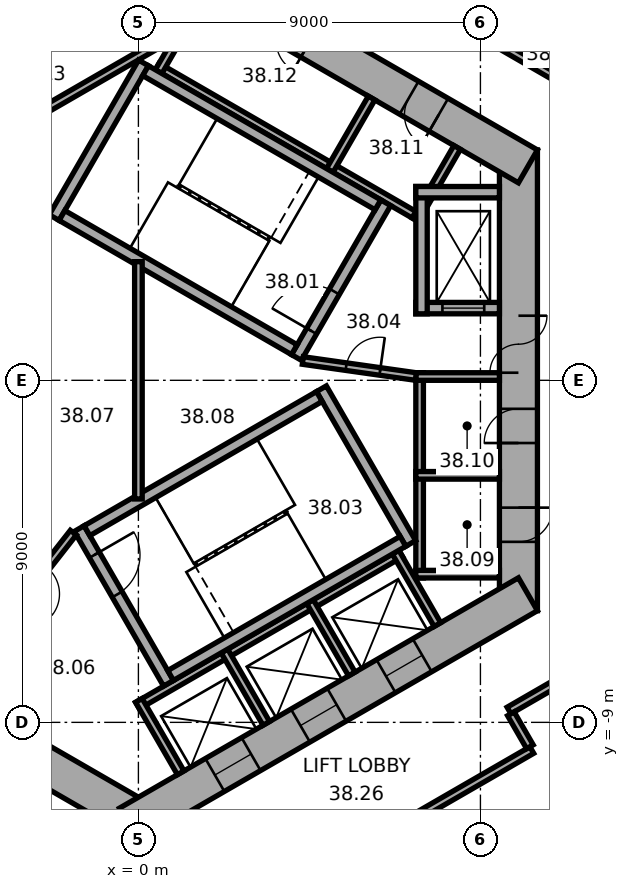
"""IFC4 building model, lengths in metres.
Left out: names, types, materials, properties, quantities, classifications, styles, units other than length and angle.
Written with IfcOpenShell. Run it as: python <this file> out.ifc"""

import sys

from ifc_helpers import new_model, si_unit, direction, frame, frame_2d, origin, place, context, subcontext, project, spatial, rectangle, extrude, element, fill, save


model = new_model("IFC4")
c1 = context("Model", 3, precision=1e-05, world=origin(), true_north=direction((0.0, 1.0)))
c2 = subcontext(c1, "Body", "Model", "MODEL_VIEW")
j1 = project(units=[si_unit("LENGTHUNIT", "METRE"), si_unit("PLANEANGLEUNIT", "RADIAN")], contexts=[c1])
p1 = place(None, origin())
s1 = spatial("IfcSite", under=j1, at=p1, CompositionType="ELEMENT")
p2 = place(p1, origin())
s2 = spatial("IfcBuilding", under=s1, at=p2, CompositionType="ELEMENT")
p3 = place(p2, frame((0.0, 0.0, 157.7)))
s3 = spatial("IfcBuildingStorey", under=s2, at=p3, CompositionType="ELEMENT", Elevation=157.7)
p4 = place(p3, frame((10.0, -6.062, 0.0), z_axis=(0.0, 0.0, 1.0), x_axis=(0.0, 1.0, 0.0)))
e1 = element("IfcWall", 1, at=p4, inside=s3, PredefinedType="SHEAR", context=c2, shape_type="SweptSolid", body=[
    extrude(rectangle(XDim=12.125, YDim=1.0, at=frame_2d((6.062, 0.0))), origin(), (0.0, 0.0, 1.0), 3.7),
])
p5 = place(p4, frame((6.262, 0.0, 0.0)))
e2 = element("IfcOpeningElement", 2, at=p5, cuts=e1, PredefinedType="OPENING", context=c2, shape_type="SweptSolid", body=[
    extrude(rectangle(XDim=1.5, YDim=2.1, at=frame_2d((0.75, 1.05))), frame((0.0, 0.51, 0.0), z_axis=(0.0, -1.0, 0.0), x_axis=(1.0, 0.0, 0.0)), (0.0, 0.0, 1.0), 1.02),
])
p6 = place(p4, frame((1.812, 0.0, 0.0)))
e3 = element("IfcOpeningElement", 3, at=p6, cuts=e1, PredefinedType="OPENING", context=c2, shape_type="SweptSolid", body=[
    extrude(rectangle(XDim=0.9, YDim=2.1, at=frame_2d((0.45, 1.05))), frame((0.0, 0.51, 0.0), z_axis=(0.0, -1.0, 0.0), x_axis=(1.0, 0.0, 0.0)), (0.0, 0.0, 1.0), 1.02),
])
p7 = place(p4, frame((4.412, 0.0, 0.0)))
e4 = element("IfcOpeningElement", 4, at=p7, cuts=e1, PredefinedType="OPENING", context=c2, shape_type="SweptSolid", body=[
    extrude(rectangle(XDim=0.9, YDim=2.1, at=frame_2d((0.45, 1.05))), frame((0.0, 0.51, 0.0), z_axis=(0.0, -1.0, 0.0), x_axis=(1.0, 0.0, 0.0)), (0.0, 0.0, 1.0), 1.02),
])
p8 = place(p3, frame((10.25, 5.629, 0.0), z_axis=(0.0, 0.0, 1.0), x_axis=(-0.866022616891, 0.50000482701, 0.0)))
e5 = element("IfcWall", 5, at=p8, inside=s3, PredefinedType="SHEAR", context=c2, shape_type="SweptSolid", body=[
    extrude(rectangle(XDim=12.125, YDim=1.0, at=frame_2d((6.062, 0.0))), origin(), (0.0, 0.0, 1.0), 3.7),
])
p9 = place(p8, frame((2.712, 0.0, 0.0)))
e6 = element("IfcOpeningElement", 6, at=p9, cuts=e5, PredefinedType="OPENING", context=c2, shape_type="SweptSolid", body=[
    extrude(rectangle(XDim=0.9, YDim=2.1, at=frame_2d((0.45, 1.05))), frame((0.0, 0.51, 0.0), z_axis=(0.0, -1.0, 0.0), x_axis=(1.0, 0.0, 0.0)), (0.0, 0.0, 1.0), 1.02),
])
p10 = place(p8, frame((6.612, 0.0, 0.0)))
e7 = element("IfcOpeningElement", 7, at=p10, cuts=e5, PredefinedType="OPENING", context=c2, shape_type="SweptSolid", body=[
    extrude(rectangle(XDim=0.9, YDim=2.1, at=frame_2d((0.45, 1.05))), frame((0.0, 0.51, 0.0), z_axis=(0.0, -1.0, 0.0), x_axis=(1.0, 0.0, 0.0)), (0.0, 0.0, 1.0), 1.02),
])
p11 = place(p3, frame((0.25, 11.691, 0.0), z_axis=(0.0, 0.0, 1.0), x_axis=(-0.866022616891, -0.50000482701, 0.0)))
e8 = element("IfcWall", 8, at=p11, inside=s3, PredefinedType="SHEAR", context=c2, shape_type="SweptSolid", body=[
    extrude(rectangle(XDim=12.125, YDim=1.0, at=frame_2d((6.062, 0.0))), origin(), (0.0, 0.0, 1.0), 3.7),
])
p12 = place(p11, frame((6.262, 0.0, 0.0)))
e9 = element("IfcOpeningElement", 9, at=p12, cuts=e8, PredefinedType="OPENING", context=c2, shape_type="SweptSolid", body=[
    extrude(rectangle(XDim=1.5, YDim=2.1, at=frame_2d((0.75, 1.05))), frame((0.0, 0.51, 0.0), z_axis=(0.0, -1.0, 0.0), x_axis=(1.0, 0.0, 0.0)), (0.0, 0.0, 1.0), 1.02),
])
p13 = place(p11, frame((3.112, 0.0, 0.0)))
e10 = element("IfcOpeningElement", 10, at=p13, cuts=e8, PredefinedType="OPENING", context=c2, shape_type="SweptSolid", body=[
    extrude(rectangle(XDim=0.9, YDim=2.1, at=frame_2d((0.45, 1.05))), frame((0.0, 0.51, 0.0), z_axis=(0.0, -1.0, 0.0), x_axis=(1.0, 0.0, 0.0)), (0.0, 0.0, 1.0), 1.02),
])
p14 = place(p3, frame((-10.25, -5.629, 0.0), z_axis=(0.0, 0.0, 1.0), x_axis=(0.866022616891, -0.50000482701, 0.0)))
e11 = element("IfcWall", 11, at=p14, inside=s3, PredefinedType="SHEAR", context=c2, shape_type="SweptSolid", body=[
    extrude(rectangle(XDim=12.125, YDim=1.0, at=frame_2d((6.062, 0.0))), origin(), (0.0, 0.0, 1.0), 3.7),
])
p15 = place(p14, frame((6.262, 0.0, 0.0)))
e12 = element("IfcOpeningElement", 12, at=p15, cuts=e11, PredefinedType="OPENING", context=c2, shape_type="SweptSolid", body=[
    extrude(rectangle(XDim=1.5, YDim=2.1, at=frame_2d((0.75, 1.05))), frame((0.0, 0.51, 0.0), z_axis=(0.0, -1.0, 0.0), x_axis=(1.0, 0.0, 0.0)), (0.0, 0.0, 1.0), 1.02),
])
p16 = place(p14, frame((1.712, 0.0, 0.0)))
e13 = element("IfcOpeningElement", 13, at=p16, cuts=e11, PredefinedType="OPENING", context=c2, shape_type="SweptSolid", body=[
    extrude(rectangle(XDim=1.1, YDim=2.1, at=frame_2d((0.55, 1.05))), frame((0.0, 0.51, 0.0), z_axis=(0.0, -1.0, 0.0), x_axis=(1.0, 0.0, 0.0)), (0.0, 0.0, 1.0), 1.02),
])
p17 = place(p14, frame((4.312, 0.0, 0.0)))
e14 = element("IfcOpeningElement", 14, at=p17, cuts=e11, PredefinedType="OPENING", context=c2, shape_type="SweptSolid", body=[
    extrude(rectangle(XDim=1.1, YDim=2.1, at=frame_2d((0.55, 1.05))), frame((0.0, 0.51, 0.0), z_axis=(0.0, -1.0, 0.0), x_axis=(1.0, 0.0, 0.0)), (0.0, 0.0, 1.0), 1.02),
])
p18 = place(p3, frame((-0.25, -11.691, 0.0), z_axis=(0.0, 0.0, 1.0), x_axis=(0.866022616891, 0.50000482701, 0.0)))
e15 = element("IfcWall", 15, at=p18, inside=s3, PredefinedType="SHEAR", context=c2, shape_type="SweptSolid", body=[
    extrude(rectangle(XDim=12.125, YDim=1.0, at=frame_2d((6.062, 0.0))), origin(), (0.0, 0.0, 1.0), 3.7),
])
p19 = place(p18, frame((2.612, 0.0, 0.0)))
e16 = element("IfcOpeningElement", 16, at=p19, cuts=e15, PredefinedType="OPENING", context=c2, shape_type="SweptSolid", body=[
    extrude(rectangle(XDim=1.1, YDim=2.1, at=frame_2d((0.55, 1.05))), frame((0.0, 0.51, 0.0), z_axis=(0.0, -1.0, 0.0), x_axis=(1.0, 0.0, 0.0)), (0.0, 0.0, 1.0), 1.02),
])
p20 = place(p18, frame((5.212, 0.0, 0.0)))
e17 = element("IfcOpeningElement", 17, at=p20, cuts=e15, PredefinedType="OPENING", context=c2, shape_type="SweptSolid", body=[
    extrude(rectangle(XDim=1.1, YDim=2.1, at=frame_2d((0.55, 1.05))), frame((0.0, 0.51, 0.0), z_axis=(0.0, -1.0, 0.0), x_axis=(1.0, 0.0, 0.0)), (0.0, 0.0, 1.0), 1.02),
])
p21 = place(p18, frame((7.812, 0.0, 0.0)))
e18 = element("IfcOpeningElement", 18, at=p21, cuts=e15, PredefinedType="OPENING", context=c2, shape_type="SweptSolid", body=[
    extrude(rectangle(XDim=1.1, YDim=2.1, at=frame_2d((0.55, 1.05))), frame((0.0, 0.51, 0.0), z_axis=(0.0, -1.0, 0.0), x_axis=(1.0, 0.0, 0.0)), (0.0, 0.0, 1.0), 1.02),
])
p22 = place(p3, frame((7.4, -5.2, 0.0), z_axis=(0.0, 0.0, 1.0), x_axis=(0.0, 1.0, 0.0)))
e19 = element("IfcWall", 19, at=p22, inside=s3, PredefinedType="PARTITIONING", context=c2, shape_type="SweptSolid", body=[
    extrude(rectangle(XDim=5.4, YDim=0.2, at=frame_2d((2.7, 0.0))), origin(), (0.0, 0.0, 1.0), 3.42),
])
for number, where, z_axis, x_axis in (
    (20, (7.3, -5.1, 0.0), (0.0, 0.0, 1.0), (1.0, 0.0, 0.0)),
    (21, (7.3, -2.5, 0.0), (0.0, 0.0, 1.0), (1.0, 0.0, 0.0)),
    (22, (7.3, 0.1, 0.0), (0.0, 0.0, 1.0), (1.0, 0.0, 0.0)),
):
    element("IfcWall", number, at=place(p3, frame(where, z_axis=z_axis, x_axis=x_axis)), inside=s3, PredefinedType="PARTITIONING", context=c2, shape_type="SweptSolid", body=[
        extrude(rectangle(XDim=2.2, YDim=0.2, at=frame_2d((1.1, 0.0))), origin(), (0.0, 0.0, 1.0), 3.42),
    ])
p23 = place(p3, frame((7.424, 4.259, 0.0), z_axis=(0.0, 0.0, 1.0), x_axis=(-0.866026010844, 0.49999894854, 0.0)))
e23 = element("IfcWall", 23, at=p23, inside=s3, PredefinedType="PARTITIONING", context=c2, shape_type="SweptSolid", body=[
    extrude(rectangle(XDim=8.0, YDim=0.2, at=frame_2d((4.0, 0.0))), origin(), (0.0, 0.0, 1.0), 3.42),
])
for number, where, z_axis, x_axis in (
    (24, (7.287, 4.222, 0.0), (0.0, 0.0, 1.0), (0.5, 0.866, 0.0)),
    (25, (5.036, 5.522, 0.0), (0.0, 0.0, 1.0), (0.5, 0.866, 0.0)),
    (26, (0.532, 8.122, 0.0), (0.0, 0.0, 1.0), (0.5, 0.866, 0.0)),
):
    element("IfcWall", number, at=place(p3, frame(where, z_axis=z_axis, x_axis=x_axis)), inside=s3, PredefinedType="PARTITIONING", context=c2, shape_type="SweptSolid", body=[
        extrude(rectangle(XDim=2.2, YDim=0.2, at=frame_2d((1.1, 0.0))), origin(), (0.0, 0.0, 1.0), 3.42),
    ])
p24 = place(p3, frame((0.803, 9.009, 0.0), z_axis=(0.0, 0.0, 1.0), x_axis=(-0.866028230842, -0.499995103361, 0.0)))
e27 = element("IfcWall", 27, at=p24, inside=s3, PredefinedType="PARTITIONING", context=c2, shape_type="SweptSolid", body=[
    extrude(rectangle(XDim=5.4, YDim=0.2, at=frame_2d((2.7, 0.0))), origin(), (0.0, 0.0, 1.0), 3.42),
])
p25 = place(p3, frame((-0.024, -8.559, 0.0), z_axis=(0.0, 0.0, 1.0), x_axis=(0.866026010844, 0.49999894854, 0.0)))
e28 = element("IfcWall", 28, at=p25, inside=s3, PredefinedType="PARTITIONING", context=c2, shape_type="SweptSolid", body=[
    extrude(rectangle(XDim=8.0, YDim=0.2, at=frame_2d((4.0, 0.0))), origin(), (0.0, 0.0, 1.0), 3.42),
])
for number, where, z_axis, x_axis in (
    (29, (0.013, -8.422, 0.0), (0.0, 0.0, 1.0), (0.5, -0.866, 0.0)),
    (30, (2.264, -7.122, 0.0), (0.0, 0.0, 1.0), (0.5, -0.866, 0.0)),
    (31, (4.516, -5.822, 0.0), (0.0, 0.0, 1.0), (0.5, -0.866, 0.0)),
    (32, (6.768, -4.522, 0.0), (0.0, 0.0, 1.0), (0.5, -0.866, 0.0)),
):
    element("IfcWall", number, at=place(p3, frame(where, z_axis=z_axis, x_axis=x_axis)), inside=s3, PredefinedType="PARTITIONING", context=c2, shape_type="SweptSolid", body=[
        extrude(rectangle(XDim=2.2, YDim=0.2, at=frame_2d((1.1, 0.0))), origin(), (0.0, 0.0, 1.0), 3.42),
    ])
p26 = place(p3, frame((4.158, 0.602, 0.0), z_axis=(0.0, 0.0, 1.0), x_axis=(0.499977259774, 0.866038532462, 0.0)))
e33 = element("IfcWall", 33, at=p26, inside=s3, PredefinedType="SHEAR", context=c2, shape_type="SweptSolid", body=[
    extrude(rectangle(XDim=4.7, YDim=0.3, at=frame_2d((2.35, 0.0))), origin(), (0.0, 0.0, 1.0), 3.42),
])
p27 = place(p26, frame((0.8, 0.0, 0.0)))
e34 = element("IfcOpeningElement", 34, at=p27, cuts=e33, PredefinedType="OPENING", context=c2, shape_type="SweptSolid", body=[
    extrude(rectangle(XDim=1.2, YDim=2.1, at=frame_2d((0.6, 1.05))), frame((0.0, 0.16, 0.0), z_axis=(0.0, -1.0, 0.0), x_axis=(1.0, 0.0, 0.0)), (0.0, 0.0, 1.0), 0.32),
])
p28 = place(p3, frame((-2.216, 4.282, 0.0), z_axis=(0.0, 0.0, 1.0), x_axis=(0.499977259774, 0.866038532462, 0.0)))
e35 = element("IfcWall", 35, at=p28, inside=s3, PredefinedType="SHEAR", context=c2, shape_type="SweptSolid", body=[
    extrude(rectangle(XDim=4.7, YDim=0.3, at=frame_2d((2.35, 0.0))), origin(), (0.0, 0.0, 1.0), 3.42),
])
for number, where, z_axis, x_axis in (
    (36, (4.103, 0.807, 0.0), (0.0, 0.0, 1.0), (-0.866, 0.5, 0.0)),
    (37, (6.303, 4.617, 0.0), (0.0, 0.0, 1.0), (-0.866, 0.5, 0.0)),
):
    element("IfcWall", number, at=place(p3, frame(where, z_axis=z_axis, x_axis=x_axis)), inside=s3, PredefinedType="SHEAR", context=c2, shape_type="SweptSolid", body=[
        extrude(rectangle(XDim=7.06, YDim=0.3, at=frame_2d((3.53, 0.0))), origin(), (0.0, 0.0, 1.0), 3.42),
    ])
p29 = place(p3, frame((-1.558, -3.902, 0.0), z_axis=(0.0, 0.0, 1.0), x_axis=(0.499977259774, -0.866038532462, 0.0)))
e38 = element("IfcWall", 38, at=p29, inside=s3, PredefinedType="SHEAR", context=c2, shape_type="SweptSolid", body=[
    extrude(rectangle(XDim=4.7, YDim=0.3, at=frame_2d((2.35, 0.0))), origin(), (0.0, 0.0, 1.0), 3.42),
])
p30 = place(p29, frame((0.8, 0.0, 0.0)))
e39 = element("IfcOpeningElement", 39, at=p30, cuts=e38, PredefinedType="OPENING", context=c2, shape_type="SweptSolid", body=[
    extrude(rectangle(XDim=1.2, YDim=2.1, at=frame_2d((0.6, 1.05))), frame((0.0, 0.16, 0.0), z_axis=(0.0, -1.0, 0.0), x_axis=(1.0, 0.0, 0.0)), (0.0, 0.0, 1.0), 0.32),
])
p31 = place(p3, frame((4.816, -0.222, 0.0), z_axis=(0.0, 0.0, 1.0), x_axis=(0.499977259774, -0.866038532462, 0.0)))
e40 = element("IfcWall", 40, at=p31, inside=s3, PredefinedType="SHEAR", context=c2, shape_type="SweptSolid", body=[
    extrude(rectangle(XDim=4.7, YDim=0.3, at=frame_2d((2.35, 0.0))), origin(), (0.0, 0.0, 1.0), 3.42),
])
for number, where, z_axis, x_axis in (
    (41, (-1.353, -3.957, 0.0), (0.0, 0.0, 1.0), (0.866, 0.5, 0.0)),
    (42, (0.847, -7.767, 0.0), (0.0, 0.0, 1.0), (0.866, 0.5, 0.0)),
):
    element("IfcWall", number, at=place(p3, frame(where, z_axis=z_axis, x_axis=x_axis)), inside=s3, PredefinedType="SHEAR", context=c2, shape_type="SweptSolid", body=[
        extrude(rectangle(XDim=7.06, YDim=0.3, at=frame_2d((3.53, 0.0))), origin(), (0.0, 0.0, 1.0), 3.42),
    ])
p32 = place(p3, frame((7.3, 1.9, 0.0), z_axis=(0.0, 0.0, 1.0), x_axis=(1.0, 0.0, 0.0)))
e43 = element("IfcWall", 43, at=p32, inside=s3, PredefinedType="SHEAR", context=c2, shape_type="SweptSolid", body=[
    extrude(rectangle(XDim=2.2, YDim=0.3, at=frame_2d((1.1, 0.0))), origin(), (0.0, 0.0, 1.0), 3.42),
])
p33 = place(p32, frame((0.7, 0.0, 0.0)))
e44 = element("IfcOpeningElement", 44, at=p33, cuts=e43, PredefinedType="OPENING", context=c2, shape_type="SweptSolid", body=[
    extrude(rectangle(XDim=1.1, YDim=2.1, at=frame_2d((0.55, 1.05))), frame((0.0, 0.16, 0.0), z_axis=(0.0, -1.0, 0.0), x_axis=(1.0, 0.0, 0.0)), (0.0, 0.0, 1.0), 0.32),
])
p34 = place(p3, frame((7.45, 1.75, 0.0), z_axis=(0.0, 0.0, 1.0), x_axis=(0.0, 1.0, 0.0)))
e45 = element("IfcWall", 45, at=p34, inside=s3, PredefinedType="SHEAR", context=c2, shape_type="SweptSolid", body=[
    extrude(rectangle(XDim=3.35, YDim=0.3, at=frame_2d((1.675, 0.0))), origin(), (0.0, 0.0, 1.0), 3.42),
])
p35 = place(p3, frame((7.3, 4.95, 0.0), z_axis=(0.0, 0.0, 1.0), x_axis=(1.0, 0.0, 0.0)))
e46 = element("IfcWall", 46, at=p35, inside=s3, PredefinedType="SHEAR", context=c2, shape_type="SweptSolid", body=[
    extrude(rectangle(XDim=2.2, YDim=0.3, at=frame_2d((1.1, 0.0))), origin(), (0.0, 0.0, 1.0), 3.42),
])
p36 = place(p3, frame((4.327, 0.521, 0.0), z_axis=(0.0, 0.0, 1.0), x_axis=(0.990124376366, -0.14019172346, 0.0)))
e47 = element("IfcWall", 47, at=p36, inside=s3, PredefinedType="PARTITIONING", context=c2, shape_type="SweptSolid", body=[
    extrude(rectangle(XDim=3.002, YDim=0.2, at=frame_2d((1.501, 0.0))), origin(), (0.0, 0.0, 1.0), 3.42),
])
p37 = place(p36, frame((1.15, 0.0, 0.0)))
e48 = element("IfcOpeningElement", 48, at=p37, cuts=e47, PredefinedType="OPENING", context=c2, shape_type="SweptSolid", body=[
    extrude(rectangle(XDim=0.9, YDim=2.1, at=frame_2d((0.45, 1.05))), frame((0.0, 0.11, 0.0), z_axis=(0.0, -1.0, 0.0), x_axis=(1.0, 0.0, 0.0)), (0.0, 0.0, 1.0), 0.22),
])
p38 = place(p3, frame((-1.712, -4.008, 0.0), z_axis=(0.0, 0.0, 1.0), x_axis=(-0.616549420702, -0.787316208287, 0.0)))
e49 = element("IfcWall", 49, at=p38, inside=s3, PredefinedType="PARTITIONING", context=c2, shape_type="SweptSolid", body=[
    extrude(rectangle(XDim=3.002, YDim=0.2, at=frame_2d((1.501, 0.0))), origin(), (0.0, 0.0, 1.0), 3.42),
])
p39 = place(p38, frame((1.15, 0.0, 0.0)))
e50 = element("IfcOpeningElement", 50, at=p39, cuts=e49, PredefinedType="OPENING", context=c2, shape_type="SweptSolid", body=[
    extrude(rectangle(XDim=0.9, YDim=2.1, at=frame_2d((0.45, 1.05))), frame((0.0, 0.11, 0.0), z_axis=(0.0, -1.0, 0.0), x_axis=(1.0, 0.0, 0.0)), (0.0, 0.0, 1.0), 0.22),
])
p40 = place(p3, frame((0.0, -3.122, 0.0), z_axis=(0.0, 0.0, 1.0), x_axis=(0.0, 1.0, 0.0)))
e51 = element("IfcWall", 51, at=p40, inside=s3, PredefinedType="PARTITIONING", context=c2, shape_type="SweptSolid", body=[
    extrude(rectangle(XDim=6.245, YDim=0.2, at=frame_2d((3.122, 0.0))), origin(), (0.0, 0.0, 1.0), 3.42),
])
p41 = place(p3, frame((2.816, -14.079, 0.0), z_axis=(0.0, 0.0, 1.0), x_axis=(0.866021128829, 0.500007404367, 0.0)))
e52 = element("IfcWall", 52, at=p41, inside=s3, PredefinedType="PARTITIONING", context=c2, shape_type="SweptSolid", body=[
    extrude(rectangle(XDim=8.702, YDim=0.2, at=frame_2d((4.351, 0.0))), origin(), (0.0, 0.0, 1.0), 3.42),
])
p42 = place(p41, frame((0.833, 0.0, 0.0)))
e53 = element("IfcOpeningElement", 53, at=p42, cuts=e52, PredefinedType="OPENING", context=c2, shape_type="SweptSolid", body=[
    extrude(rectangle(XDim=1.0, YDim=2.1, at=frame_2d((0.5, 1.05))), frame((0.0, 0.11, 0.0), z_axis=(0.0, -1.0, 0.0), x_axis=(1.0, 0.0, 0.0)), (0.0, 0.0, 1.0), 0.22),
])
p43 = place(p3, frame((9.752, -8.688, 0.0), z_axis=(0.0, 0.0, 1.0), x_axis=(0.865974105138, 0.500088841337, 0.0)))
e54 = element("IfcWall", 54, at=p43, inside=s3, PredefinedType="PARTITIONING", context=c2, shape_type="SweptSolid", body=[
    extrude(rectangle(XDim=1.961, YDim=0.2, at=frame_2d((0.98, 0.0))), origin(), (0.0, 0.0, 1.0), 3.42),
])
p44 = place(p3, frame((10.302, -9.642, 0.0), z_axis=(0.0, 0.0, 1.0), x_axis=(-0.500074377092, 0.865982457891, 0.0)))
e55 = element("IfcWall", 55, at=p44, inside=s3, PredefinedType="PARTITIONING", context=c2, shape_type="SweptSolid", body=[
    extrude(rectangle(XDim=1.001, YDim=0.2, at=frame_2d((0.5, 0.0))), origin(), (0.0, 0.0, 1.0), 3.42),
])
p45 = place(p3, frame((11.233, 7.833, 0.0), z_axis=(0.0, 0.0, 1.0), x_axis=(-0.866008176907, 0.50002983664, 0.0)))
e56 = element("IfcWall", 56, at=p45, inside=s3, PredefinedType="PARTITIONING", context=c2, shape_type="SweptSolid", body=[
    extrude(rectangle(XDim=2.2, YDim=0.2, at=frame_2d((1.1, 0.0))), origin(), (0.0, 0.0, 1.0), 3.42),
])
p46 = place(p5, origin())
e57 = element("IfcDoor", 57, at=p46, inside=s3, OperationType="DOUBLE_DOOR_SINGLE_SWING", PredefinedType="DOOR", context=c2, shape_type="SweptSolid", body=[
    extrude(rectangle(XDim=1.5, YDim=2.1, at=frame_2d((0.75, 1.05))), frame((0.0, 0.025, 0.0), z_axis=(0.0, -1.0, 0.0), x_axis=(1.0, 0.0, 0.0)), (0.0, 0.0, 1.0), 0.05),
])
fill(e2, e57)
p47 = place(p27, origin())
e58 = element("IfcDoor", 58, at=p47, inside=s3, OperationType="SINGLE_SWING_RIGHT", PredefinedType="DOOR", context=c2, shape_type="SweptSolid", body=[
    extrude(rectangle(XDim=1.2, YDim=2.1, at=frame_2d((0.6, 1.05))), frame((0.0, 0.025, 0.0), z_axis=(0.0, -1.0, 0.0), x_axis=(1.0, 0.0, 0.0)), (0.0, 0.0, 1.0), 0.05),
])
fill(e34, e58)
p48 = place(p30, origin())
e59 = element("IfcDoor", 59, at=p48, inside=s3, OperationType="SINGLE_SWING_RIGHT", PredefinedType="DOOR", context=c2, shape_type="SweptSolid", body=[
    extrude(rectangle(XDim=1.2, YDim=2.1, at=frame_2d((0.6, 1.05))), frame((0.0, 0.025, 0.0), z_axis=(0.0, -1.0, 0.0), x_axis=(1.0, 0.0, 0.0)), (0.0, 0.0, 1.0), 0.05),
])
fill(e39, e59)
p49 = place(p37, origin())
e60 = element("IfcDoor", 60, at=p49, inside=s3, OperationType="SINGLE_SWING_LEFT", PredefinedType="DOOR", context=c2, shape_type="SweptSolid", body=[
    extrude(rectangle(XDim=0.9, YDim=2.1, at=frame_2d((0.45, 1.05))), frame((0.0, 0.025, 0.0), z_axis=(0.0, -1.0, 0.0), x_axis=(1.0, 0.0, 0.0)), (0.0, 0.0, 1.0), 0.05),
])
fill(e48, e60)
p50 = place(p6, origin())
e61 = element("IfcDoor", 61, at=p50, inside=s3, OperationType="SINGLE_SWING_LEFT", PredefinedType="DOOR", context=c2, shape_type="SweptSolid", body=[
    extrude(rectangle(XDim=0.9, YDim=2.1, at=frame_2d((0.45, 1.05))), frame((0.0, 0.025, 0.0), z_axis=(0.0, -1.0, 0.0), x_axis=(1.0, 0.0, 0.0)), (0.0, 0.0, 1.0), 0.05),
])
fill(e3, e61)
p51 = place(p7, origin())
e62 = element("IfcDoor", 62, at=p51, inside=s3, OperationType="SINGLE_SWING_LEFT", PredefinedType="DOOR", context=c2, shape_type="SweptSolid", body=[
    extrude(rectangle(XDim=0.9, YDim=2.1, at=frame_2d((0.45, 1.05))), frame((0.0, 0.025, 0.0), z_axis=(0.0, -1.0, 0.0), x_axis=(1.0, 0.0, 0.0)), (0.0, 0.0, 1.0), 0.05),
])
fill(e4, e62)
p52 = place(p9, origin())
e63 = element("IfcDoor", 63, at=p52, inside=s3, OperationType="SINGLE_SWING_LEFT", PredefinedType="DOOR", context=c2, shape_type="SweptSolid", body=[
    extrude(rectangle(XDim=0.9, YDim=2.1, at=frame_2d((0.45, 1.05))), frame((0.0, 0.025, 0.0), z_axis=(0.0, -1.0, 0.0), x_axis=(1.0, 0.0, 0.0)), (0.0, 0.0, 1.0), 0.05),
])
fill(e6, e63)
p53 = place(p33, origin())
e64 = element("IfcDoor", 64, at=p53, inside=s3, OperationType="DOUBLE_DOOR_SLIDING", PredefinedType="DOOR", context=c2, shape_type="SweptSolid", body=[
    extrude(rectangle(XDim=1.1, YDim=2.1, at=frame_2d((0.55, 1.05))), frame((0.0, 0.025, 0.0), z_axis=(0.0, -1.0, 0.0), x_axis=(1.0, 0.0, 0.0)), (0.0, 0.0, 1.0), 0.05),
])
fill(e44, e64)
p54 = place(p19, origin())
e65 = element("IfcDoor", 65, at=p54, inside=s3, OperationType="DOUBLE_DOOR_SLIDING", PredefinedType="DOOR", context=c2, shape_type="SweptSolid", body=[
    extrude(rectangle(XDim=1.1, YDim=2.1, at=frame_2d((0.55, 1.05))), frame((0.0, 0.025, 0.0), z_axis=(0.0, -1.0, 0.0), x_axis=(1.0, 0.0, 0.0)), (0.0, 0.0, 1.0), 0.05),
])
fill(e16, e65)
p55 = place(p20, origin())
e66 = element("IfcDoor", 66, at=p55, inside=s3, OperationType="DOUBLE_DOOR_SLIDING", PredefinedType="DOOR", context=c2, shape_type="SweptSolid", body=[
    extrude(rectangle(XDim=1.1, YDim=2.1, at=frame_2d((0.55, 1.05))), frame((0.0, 0.025, 0.0), z_axis=(0.0, -1.0, 0.0), x_axis=(1.0, 0.0, 0.0)), (0.0, 0.0, 1.0), 0.05),
])
fill(e17, e66)
p56 = place(p21, origin())
e67 = element("IfcDoor", 67, at=p56, inside=s3, OperationType="DOUBLE_DOOR_SLIDING", PredefinedType="DOOR", context=c2, shape_type="SweptSolid", body=[
    extrude(rectangle(XDim=1.1, YDim=2.1, at=frame_2d((0.55, 1.05))), frame((0.0, 0.025, 0.0), z_axis=(0.0, -1.0, 0.0), x_axis=(1.0, 0.0, 0.0)), (0.0, 0.0, 1.0), 0.05),
])
fill(e18, e67)
save(model, sys.argv[1])
